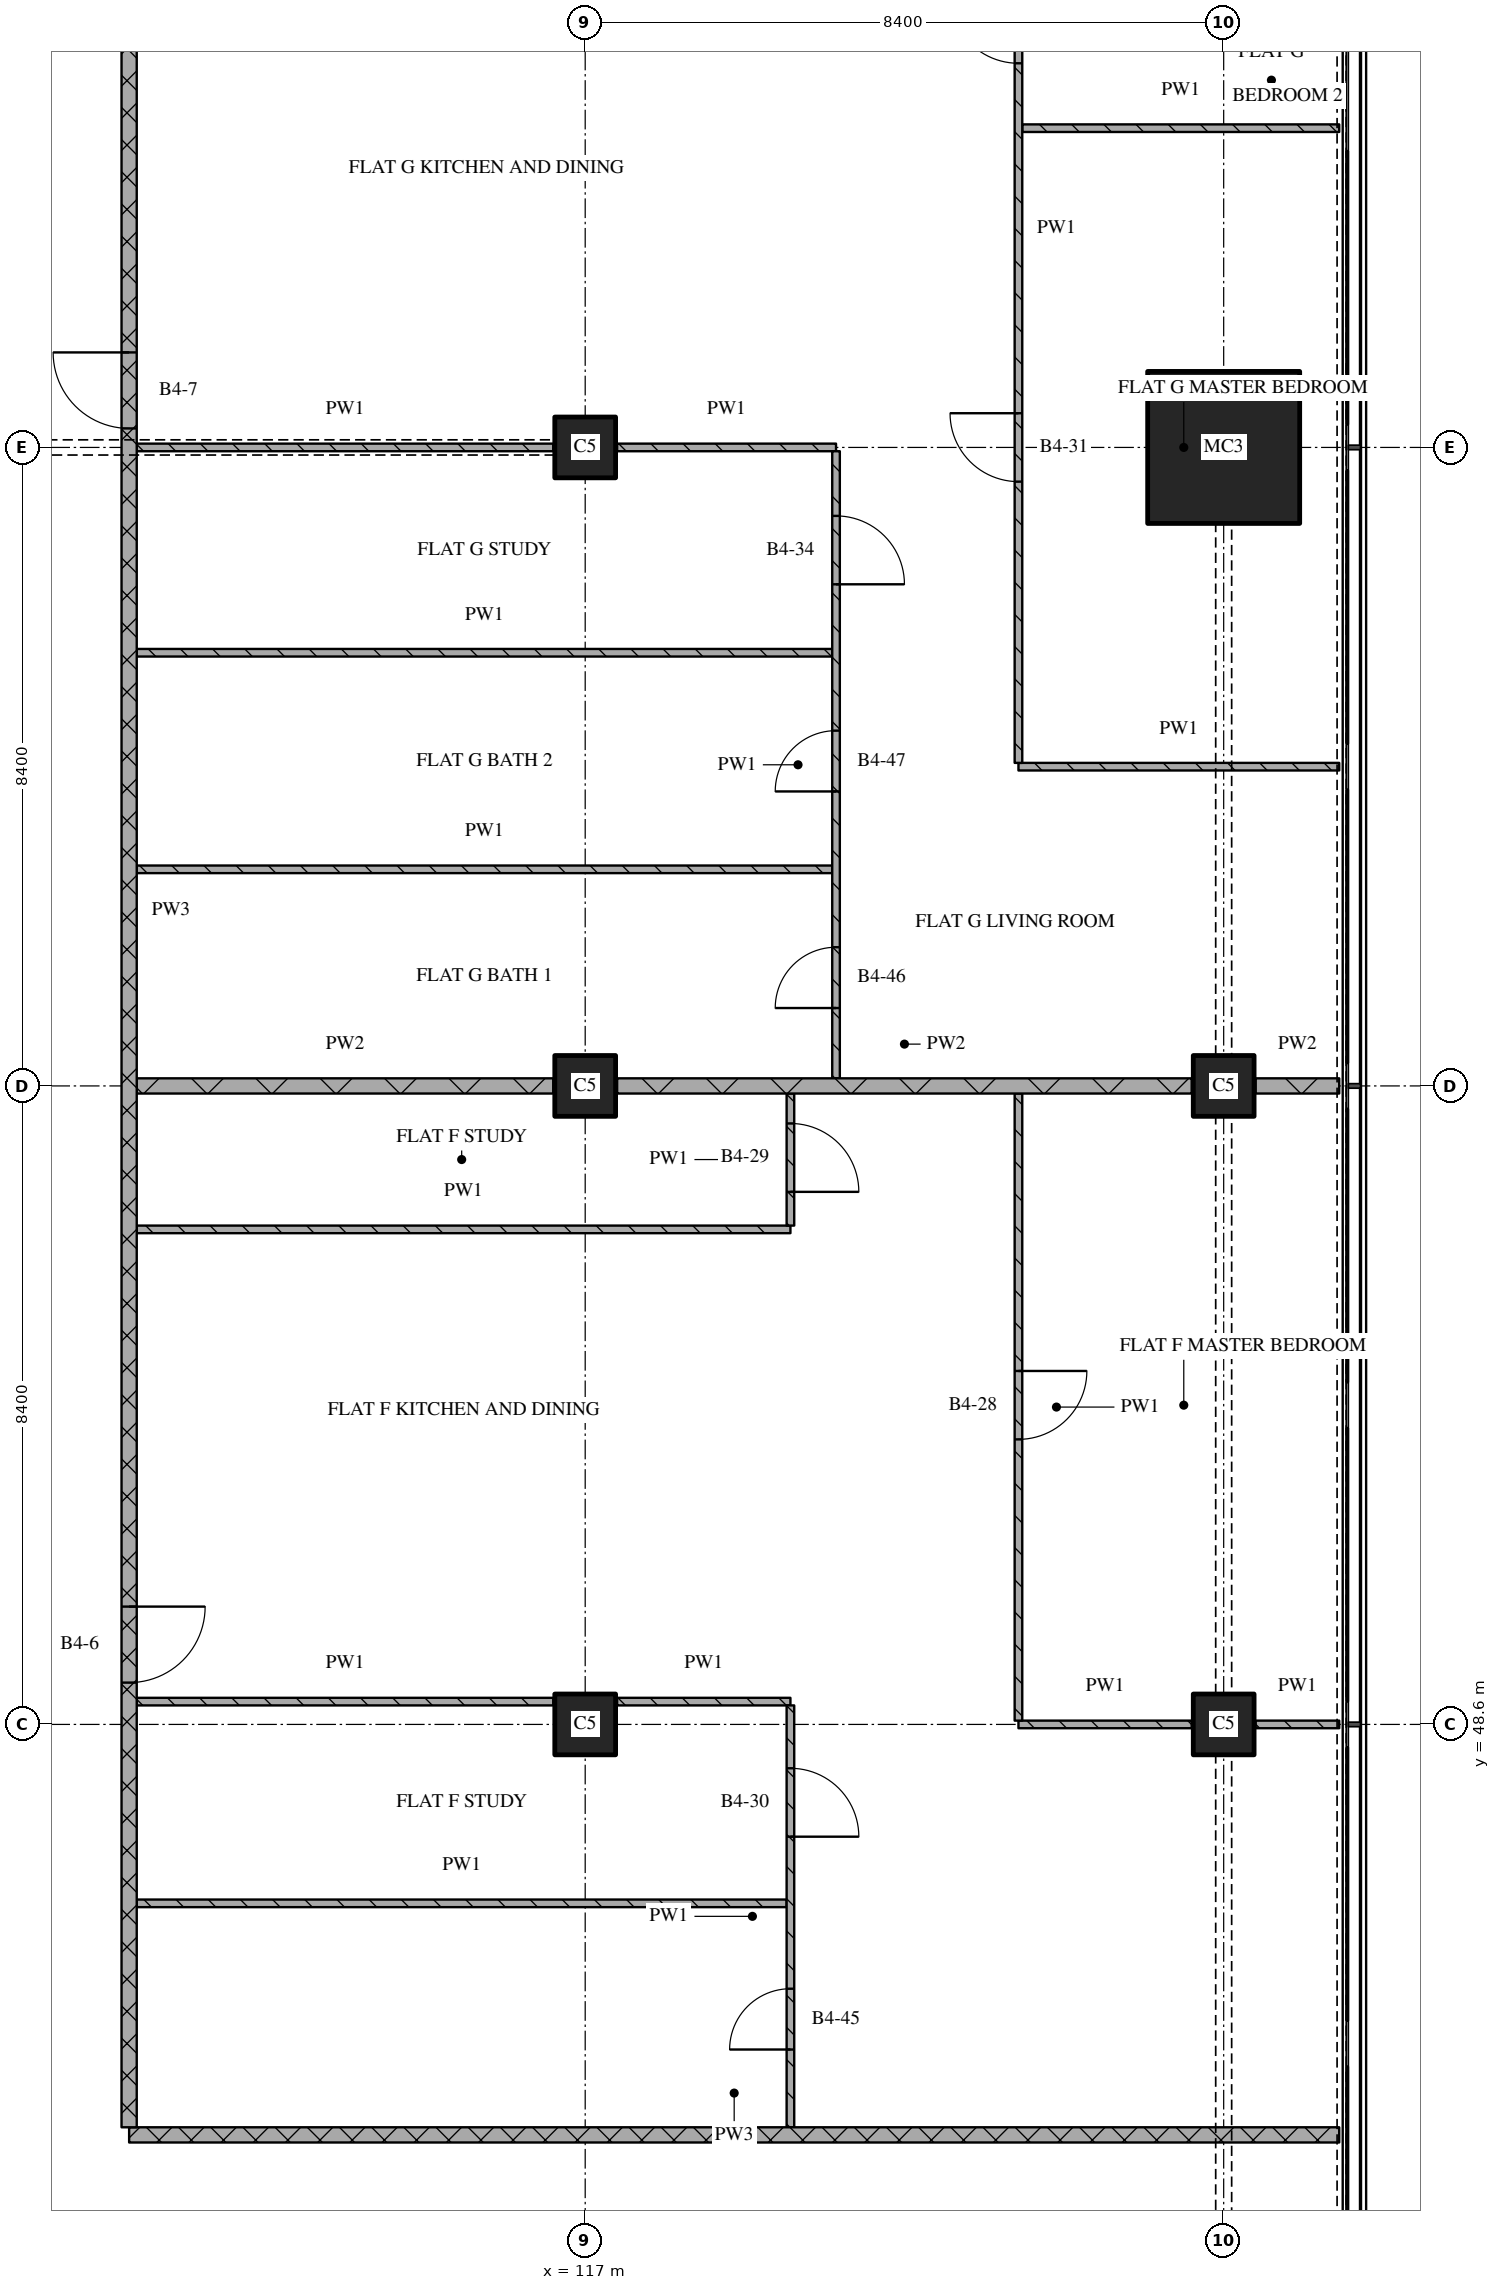
"""IFC4 building model, lengths in metres.
Left out: names, types, materials, properties, quantities, classifications, styles, units other than length and angle.
Written with IfcOpenShell. Run it as: python <this file> out.ifc"""

import sys

from ifc_helpers import new_model, si_unit, direction, frame, frame_2d, origin, origin_2d, place, context, subcontext, project, spatial, rectangle, extrude, element, fill, save


model = new_model("IFC4")
c1 = context("Model", 3, precision=1e-05, world=origin(), true_north=direction((0.0, 1.0)))
c2 = subcontext(c1, "Body", "Model", "MODEL_VIEW")
j1 = project(units=[si_unit("LENGTHUNIT", "METRE"), si_unit("PLANEANGLEUNIT", "RADIAN")], contexts=[c1])
p1 = place(None, origin())
s1 = spatial("IfcSite", under=j1, at=p1, CompositionType="ELEMENT")
p2 = place(p1, origin())
s2 = spatial("IfcBuilding", under=s1, at=p2, CompositionType="ELEMENT")
p3 = place(p2, frame((0.0, 0.0, 131.25)))
s3 = spatial("IfcBuildingStorey", under=s2, at=p3, CompositionType="ELEMENT", Elevation=131.25)
for number, where, z_axis, x_axis in (
    (1, (117.0, 48.6, 0.0), (0.0, 0.0, 1.0), (1.0, 0.0, 0.0)),
    (2, (117.0, 57.0, 0.0), (0.0, 0.0, 1.0), (1.0, 0.0, 0.0)),
    (3, (117.0, 65.4, 0.0), (0.0, 0.0, 1.0), (1.0, 0.0, 0.0)),
    (4, (125.4, 48.6, 0.0), (0.0, 0.0, 1.0), (1.0, 0.0, 0.0)),
    (5, (125.4, 57.0, 0.0), (0.0, 0.0, 1.0), (1.0, 0.0, 0.0)),
):
    element("IfcColumn", number, at=place(p3, frame(where, z_axis=z_axis, x_axis=x_axis)), inside=s3, PredefinedType="COLUMN", context=c2, shape_type="SweptSolid", body=[
        extrude(rectangle(XDim=0.8, YDim=0.8, at=origin_2d()), origin(), (0.0, 0.0, 1.0), 3.6),
    ])
p4 = place(p3, frame((125.4, 65.4, 0.0), z_axis=(0.0, 0.0, 1.0), x_axis=(1.0, 0.0, 0.0)))
e6 = element("IfcColumn", 6, at=p4, inside=s3, PredefinedType="COLUMN", context=c2, shape_type="SweptSolid", body=[
    extrude(rectangle(XDim=2.0, YDim=2.0, at=origin_2d()), origin(), (0.0, 0.0, 1.0), 3.6),
])
p5 = place(p3, frame((111.0, 43.2, 0.0), z_axis=(0.0, 0.0, 1.0), x_axis=(1.0, 0.0, 0.0)))
e7 = element("IfcWall", 7, at=p5, inside=s3, PredefinedType="PARTITIONING", context=c2, shape_type="SweptSolid", body=[
    extrude(rectangle(XDim=15.92, YDim=0.2, at=frame_2d((7.96, 0.0))), origin(), (0.0, 0.0, 1.0), 3.32),
])
p6 = place(p3, frame((111.1, 46.246, 0.0), z_axis=(0.0, 0.0, 1.0), x_axis=(1.0, 0.0, 0.0)))
e8 = element("IfcWall", 8, at=p6, inside=s3, PredefinedType="PARTITIONING", context=c2, shape_type="SweptSolid", body=[
    extrude(rectangle(XDim=8.55, YDim=0.1, at=frame_2d((4.275, 0.0))), origin(), (0.0, 0.0, 1.0), 3.32),
])
p7 = place(p3, frame((122.7, 48.6, 0.0), z_axis=(0.0, 0.0, 1.0), x_axis=(1.0, 0.0, 0.0)))
e9 = element("IfcWall", 9, at=p7, inside=s3, PredefinedType="PARTITIONING", context=c2, shape_type="SweptSolid", body=[
    extrude(rectangle(XDim=2.28, YDim=0.1, at=frame_2d((1.14, 0.0))), origin(), (0.0, 0.0, 1.0), 3.32),
])
p8 = place(p3, frame((125.82, 48.6, 0.0), z_axis=(0.0, 0.0, 1.0), x_axis=(1.0, 0.0, 0.0)))
e10 = element("IfcWall", 10, at=p8, inside=s3, PredefinedType="PARTITIONING", context=c2, shape_type="SweptSolid", body=[
    extrude(rectangle(XDim=1.1, YDim=0.1, at=frame_2d((0.55, 0.0))), origin(), (0.0, 0.0, 1.0), 3.32),
])
p9 = place(p3, frame((111.1, 48.9, 0.0), z_axis=(0.0, 0.0, 1.0), x_axis=(1.0, 0.0, 0.0)))
e11 = element("IfcWall", 11, at=p9, inside=s3, PredefinedType="PARTITIONING", context=c2, shape_type="SweptSolid", body=[
    extrude(rectangle(XDim=5.48, YDim=0.1, at=frame_2d((2.74, 0.0))), origin(), (0.0, 0.0, 1.0), 3.32),
])
p10 = place(p3, frame((117.42, 48.9, 0.0), z_axis=(0.0, 0.0, 1.0), x_axis=(1.0, 0.0, 0.0)))
e12 = element("IfcWall", 12, at=p10, inside=s3, PredefinedType="PARTITIONING", context=c2, shape_type="SweptSolid", body=[
    extrude(rectangle(XDim=2.28, YDim=0.1, at=frame_2d((1.14, 0.0))), origin(), (0.0, 0.0, 1.0), 3.32),
])
p11 = place(p3, frame((111.1, 55.113, 0.0), z_axis=(0.0, 0.0, 1.0), x_axis=(1.0, 0.0, 0.0)))
e13 = element("IfcWall", 13, at=p11, inside=s3, PredefinedType="PARTITIONING", context=c2, shape_type="SweptSolid", body=[
    extrude(rectangle(XDim=8.6, YDim=0.1, at=frame_2d((4.3, 0.0))), origin(), (0.0, 0.0, 1.0), 3.32),
])
p12 = place(p3, frame((111.1, 57.0, 0.0), z_axis=(0.0, 0.0, 1.0), x_axis=(1.0, 0.0, 0.0)))
e14 = element("IfcWall", 14, at=p12, inside=s3, PredefinedType="PARTITIONING", context=c2, shape_type="SweptSolid", body=[
    extrude(rectangle(XDim=5.48, YDim=0.2, at=frame_2d((2.74, 0.0))), origin(), (0.0, 0.0, 1.0), 3.32),
])
p13 = place(p3, frame((117.42, 57.0, 0.0), z_axis=(0.0, 0.0, 1.0), x_axis=(1.0, 0.0, 0.0)))
e15 = element("IfcWall", 15, at=p13, inside=s3, PredefinedType="PARTITIONING", context=c2, shape_type="SweptSolid", body=[
    extrude(rectangle(XDim=7.56, YDim=0.2, at=frame_2d((3.78, 0.0))), origin(), (0.0, 0.0, 1.0), 3.32),
])
p14 = place(p3, frame((125.82, 57.0, 0.0), z_axis=(0.0, 0.0, 1.0), x_axis=(1.0, 0.0, 0.0)))
e16 = element("IfcWall", 16, at=p14, inside=s3, PredefinedType="PARTITIONING", context=c2, shape_type="SweptSolid", body=[
    extrude(rectangle(XDim=1.1, YDim=0.2, at=frame_2d((0.55, 0.0))), origin(), (0.0, 0.0, 1.0), 3.32),
])
p15 = place(p3, frame((111.1, 59.85, 0.0), z_axis=(0.0, 0.0, 1.0), x_axis=(1.0, 0.0, 0.0)))
e17 = element("IfcWall", 17, at=p15, inside=s3, PredefinedType="PARTITIONING", context=c2, shape_type="SweptSolid", body=[
    extrude(rectangle(XDim=9.15, YDim=0.1, at=frame_2d((4.575, 0.0))), origin(), (0.0, 0.0, 1.0), 3.32),
])
p16 = place(p3, frame((122.7, 61.2, 0.0), z_axis=(0.0, 0.0, 1.0), x_axis=(1.0, 0.0, 0.0)))
e18 = element("IfcWall", 18, at=p16, inside=s3, PredefinedType="PARTITIONING", context=c2, shape_type="SweptSolid", body=[
    extrude(rectangle(XDim=4.22, YDim=0.1, at=frame_2d((2.11, 0.0))), origin(), (0.0, 0.0, 1.0), 3.32),
])
p17 = place(p3, frame((111.1, 62.699, 0.0), z_axis=(0.0, 0.0, 1.0), x_axis=(1.0, 0.0, 0.0)))
e19 = element("IfcWall", 19, at=p17, inside=s3, PredefinedType="PARTITIONING", context=c2, shape_type="SweptSolid", body=[
    extrude(rectangle(XDim=9.15, YDim=0.1, at=frame_2d((4.575, 0.0))), origin(), (0.0, 0.0, 1.0), 3.32),
])
p18 = place(p3, frame((111.1, 65.4, 0.0), z_axis=(0.0, 0.0, 1.0), x_axis=(1.0, 0.0, 0.0)))
e20 = element("IfcWall", 20, at=p18, inside=s3, PredefinedType="PARTITIONING", context=c2, shape_type="SweptSolid", body=[
    extrude(rectangle(XDim=5.48, YDim=0.1, at=frame_2d((2.74, 0.0))), origin(), (0.0, 0.0, 1.0), 2.82),
])
p19 = place(p3, frame((117.42, 65.4, 0.0), z_axis=(0.0, 0.0, 1.0), x_axis=(1.0, 0.0, 0.0)))
e21 = element("IfcWall", 21, at=p19, inside=s3, PredefinedType="PARTITIONING", context=c2, shape_type="SweptSolid", body=[
    extrude(rectangle(XDim=2.88, YDim=0.1, at=frame_2d((1.44, 0.0))), origin(), (0.0, 0.0, 1.0), 3.32),
])
p20 = place(p3, frame((122.75, 69.6, 0.0), z_axis=(0.0, 0.0, 1.0), x_axis=(1.0, 0.0, 0.0)))
e22 = element("IfcWall", 22, at=p20, inside=s3, PredefinedType="PARTITIONING", context=c2, shape_type="SweptSolid", body=[
    extrude(rectangle(XDim=4.17, YDim=0.1, at=frame_2d((2.085, 0.0))), origin(), (0.0, 0.0, 1.0), 3.32),
])
p21 = place(p3, frame((111.0, 75.32, 0.0), z_axis=(0.0, 0.0, 1.0), x_axis=(0.0, -1.0, 0.0)))
e23 = element("IfcWall", 23, at=p21, inside=s3, PredefinedType="PARTITIONING", context=c2, shape_type="SweptSolid", body=[
    extrude(rectangle(XDim=32.02, YDim=0.2, at=frame_2d((16.01, 0.0))), origin(), (0.0, 0.0, 1.0), 3.32),
])
p22 = place(p21, frame((8.67, 0.0, 0.0)))
e24 = element("IfcOpeningElement", 24, at=p22, cuts=e23, PredefinedType="OPENING", context=c2, shape_type="SweptSolid", body=[
    extrude(rectangle(XDim=1.0, YDim=2.1, at=frame_2d((0.5, 1.05))), frame((0.0, 0.11, 0.0), z_axis=(0.0, -1.0, 0.0), x_axis=(1.0, 0.0, 0.0)), (0.0, 0.0, 1.0), 0.22),
])
p23 = place(p21, frame((25.17, 0.0, 0.0)))
e25 = element("IfcOpeningElement", 25, at=p23, cuts=e23, PredefinedType="OPENING", context=c2, shape_type="SweptSolid", body=[
    extrude(rectangle(XDim=1.0, YDim=2.1, at=frame_2d((0.5, 1.05))), frame((0.0, 0.11, 0.0), z_axis=(0.0, -1.0, 0.0), x_axis=(1.0, 0.0, 0.0)), (0.0, 0.0, 1.0), 0.22),
])
p24 = place(p3, frame((119.7, 43.3, 0.0), z_axis=(0.0, 0.0, 1.0), x_axis=(0.0, 1.0, 0.0)))
e26 = element("IfcWall", 26, at=p24, inside=s3, PredefinedType="PARTITIONING", context=c2, shape_type="SweptSolid", body=[
    extrude(rectangle(XDim=5.55, YDim=0.1, at=frame_2d((2.775, 0.0))), origin(), (0.0, 0.0, 1.0), 3.32),
])
p25 = place(p24, frame((1.023, 0.0, 0.0)))
e27 = element("IfcOpeningElement", 27, at=p25, cuts=e26, PredefinedType="OPENING", context=c2, shape_type="SweptSolid", body=[
    extrude(rectangle(XDim=0.8, YDim=2.1, at=frame_2d((0.4, 1.05))), frame((0.0, 0.06, 0.0), z_axis=(0.0, -1.0, 0.0), x_axis=(1.0, 0.0, 0.0)), (0.0, 0.0, 1.0), 0.12),
])
p26 = place(p24, frame((3.823, 0.0, 0.0)))
e28 = element("IfcOpeningElement", 28, at=p26, cuts=e26, PredefinedType="OPENING", context=c2, shape_type="SweptSolid", body=[
    extrude(rectangle(XDim=0.9, YDim=2.1, at=frame_2d((0.45, 1.05))), frame((0.0, 0.06, 0.0), z_axis=(0.0, -1.0, 0.0), x_axis=(1.0, 0.0, 0.0)), (0.0, 0.0, 1.0), 0.12),
])
p27 = place(p3, frame((119.7, 55.163, 0.0), z_axis=(0.0, 0.0, 1.0), x_axis=(0.0, 1.0, 0.0)))
e29 = element("IfcWall", 29, at=p27, inside=s3, PredefinedType="PARTITIONING", context=c2, shape_type="SweptSolid", body=[
    extrude(rectangle(XDim=1.737, YDim=0.1, at=frame_2d((0.869, 0.0))), origin(), (0.0, 0.0, 1.0), 3.32),
])
p28 = place(p27, frame((0.444, 0.0, 0.0)))
e30 = element("IfcOpeningElement", 30, at=p28, cuts=e29, PredefinedType="OPENING", context=c2, shape_type="SweptSolid", body=[
    extrude(rectangle(XDim=0.9, YDim=2.1, at=frame_2d((0.45, 1.05))), frame((0.0, 0.06, 0.0), z_axis=(0.0, -1.0, 0.0), x_axis=(1.0, 0.0, 0.0)), (0.0, 0.0, 1.0), 0.12),
])
p29 = place(p3, frame((120.3, 57.1, 0.0), z_axis=(0.0, 0.0, 1.0), x_axis=(0.0, 1.0, 0.0)))
e31 = element("IfcWall", 31, at=p29, inside=s3, PredefinedType="PARTITIONING", context=c2, shape_type="SweptSolid", body=[
    extrude(rectangle(XDim=8.25, YDim=0.1, at=frame_2d((4.125, 0.0))), origin(), (0.0, 0.0, 1.0), 3.32),
])
p30 = place(p29, frame((0.925, 0.0, 0.0)))
e32 = element("IfcOpeningElement", 32, at=p30, cuts=e31, PredefinedType="OPENING", context=c2, shape_type="SweptSolid", body=[
    extrude(rectangle(XDim=0.8, YDim=2.1, at=frame_2d((0.4, 1.05))), frame((0.0, 0.06, 0.0), z_axis=(0.0, -1.0, 0.0), x_axis=(1.0, 0.0, 0.0)), (0.0, 0.0, 1.0), 0.12),
])
p31 = place(p29, frame((3.774, 0.0, 0.0)))
e33 = element("IfcOpeningElement", 33, at=p31, cuts=e31, PredefinedType="OPENING", context=c2, shape_type="SweptSolid", body=[
    extrude(rectangle(XDim=0.8, YDim=2.1, at=frame_2d((0.4, 1.05))), frame((0.0, 0.06, 0.0), z_axis=(0.0, -1.0, 0.0), x_axis=(1.0, 0.0, 0.0)), (0.0, 0.0, 1.0), 0.12),
])
p32 = place(p29, frame((6.5, 0.0, 0.0)))
e34 = element("IfcOpeningElement", 34, at=p32, cuts=e31, PredefinedType="OPENING", context=c2, shape_type="SweptSolid", body=[
    extrude(rectangle(XDim=0.9, YDim=2.1, at=frame_2d((0.45, 1.05))), frame((0.0, 0.06, 0.0), z_axis=(0.0, -1.0, 0.0), x_axis=(1.0, 0.0, 0.0)), (0.0, 0.0, 1.0), 0.12),
])
p33 = place(p3, frame((122.7, 56.9, 0.0), z_axis=(0.0, 0.0, 1.0), x_axis=(0.0, -1.0, 0.0)))
e35 = element("IfcWall", 35, at=p33, inside=s3, PredefinedType="PARTITIONING", context=c2, shape_type="SweptSolid", body=[
    extrude(rectangle(XDim=8.25, YDim=0.1, at=frame_2d((4.125, 0.0))), origin(), (0.0, 0.0, 1.0), 3.32),
])
p34 = place(p33, frame((3.65, 0.0, 0.0)))
e36 = element("IfcOpeningElement", 36, at=p34, cuts=e35, PredefinedType="OPENING", context=c2, shape_type="SweptSolid", body=[
    extrude(rectangle(XDim=0.9, YDim=2.1, at=frame_2d((0.45, 1.05))), frame((0.0, 0.06, 0.0), z_axis=(0.0, -1.0, 0.0), x_axis=(1.0, 0.0, 0.0)), (0.0, 0.0, 1.0), 0.12),
])
p35 = place(p3, frame((122.7, 75.32, 0.0), z_axis=(0.0, 0.0, 1.0), x_axis=(0.0, -1.0, 0.0)))
e37 = element("IfcWall", 37, at=p35, inside=s3, PredefinedType="PARTITIONING", context=c2, shape_type="SweptSolid", body=[
    extrude(rectangle(XDim=14.07, YDim=0.1, at=frame_2d((7.035, 0.0))), origin(), (0.0, 0.0, 1.0), 3.32),
])
p36 = place(p35, frame((3.966, 0.0, 0.0)))
e38 = element("IfcOpeningElement", 38, at=p36, cuts=e37, PredefinedType="OPENING", context=c2, shape_type="SweptSolid", body=[
    extrude(rectangle(XDim=0.9, YDim=2.1, at=frame_2d((0.45, 1.05))), frame((0.0, 0.06, 0.0), z_axis=(0.0, -1.0, 0.0), x_axis=(1.0, 0.0, 0.0)), (0.0, 0.0, 1.0), 0.12),
])
p37 = place(p35, frame((9.47, 0.0, 0.0)))
e39 = element("IfcOpeningElement", 39, at=p37, cuts=e37, PredefinedType="OPENING", context=c2, shape_type="SweptSolid", body=[
    extrude(rectangle(XDim=0.9, YDim=2.1, at=frame_2d((0.45, 1.05))), frame((0.0, 0.06, 0.0), z_axis=(0.0, -1.0, 0.0), x_axis=(1.0, 0.0, 0.0)), (0.0, 0.0, 1.0), 0.12),
])
p38 = place(p22, origin())
e40 = element("IfcDoor", 40, at=p38, inside=s3, OperationType="SINGLE_SWING_RIGHT", PredefinedType="DOOR", context=c2, shape_type="SweptSolid", body=[
    extrude(rectangle(XDim=1.0, YDim=2.1, at=frame_2d((0.5, 1.05))), frame((0.0, 0.025, 0.0), z_axis=(0.0, -1.0, 0.0), x_axis=(1.0, 0.0, 0.0)), (0.0, 0.0, 1.0), 0.05),
])
fill(e24, e40)
p39 = place(p23, origin())
e41 = element("IfcDoor", 41, at=p39, inside=s3, OperationType="SINGLE_SWING_LEFT", PredefinedType="DOOR", context=c2, shape_type="SweptSolid", body=[
    extrude(rectangle(XDim=1.0, YDim=2.1, at=frame_2d((0.5, 1.05))), frame((0.0, 0.025, 0.0), z_axis=(0.0, -1.0, 0.0), x_axis=(1.0, 0.0, 0.0)), (0.0, 0.0, 1.0), 0.05),
])
fill(e25, e41)
p40 = place(p25, origin())
e42 = element("IfcDoor", 42, at=p40, inside=s3, OperationType="SINGLE_SWING_LEFT", PredefinedType="DOOR", context=c2, shape_type="SweptSolid", body=[
    extrude(rectangle(XDim=0.8, YDim=2.1, at=frame_2d((0.4, 1.05))), frame((0.0, 0.025, 0.0), z_axis=(0.0, -1.0, 0.0), x_axis=(1.0, 0.0, 0.0)), (0.0, 0.0, 1.0), 0.05),
])
fill(e27, e42)
p41 = place(p26, origin())
e43 = element("IfcDoor", 43, at=p41, inside=s3, OperationType="SINGLE_SWING_RIGHT", PredefinedType="DOOR", context=c2, shape_type="SweptSolid", body=[
    extrude(rectangle(XDim=0.9, YDim=2.1, at=frame_2d((0.45, 1.05))), frame((0.0, 0.025, 0.0), z_axis=(0.0, -1.0, 0.0), x_axis=(1.0, 0.0, 0.0)), (0.0, 0.0, 1.0), 0.05),
])
fill(e28, e43)
p42 = place(p28, origin())
e44 = element("IfcDoor", 44, at=p42, inside=s3, OperationType="SINGLE_SWING_RIGHT", PredefinedType="DOOR", context=c2, shape_type="SweptSolid", body=[
    extrude(rectangle(XDim=0.9, YDim=2.1, at=frame_2d((0.45, 1.05))), frame((0.0, 0.025, 0.0), z_axis=(0.0, -1.0, 0.0), x_axis=(1.0, 0.0, 0.0)), (0.0, 0.0, 1.0), 0.05),
])
fill(e30, e44)
p43 = place(p30, origin())
e45 = element("IfcDoor", 45, at=p43, inside=s3, OperationType="SINGLE_SWING_LEFT", PredefinedType="DOOR", context=c2, shape_type="SweptSolid", body=[
    extrude(rectangle(XDim=0.8, YDim=2.1, at=frame_2d((0.4, 1.05))), frame((0.0, 0.025, 0.0), z_axis=(0.0, -1.0, 0.0), x_axis=(1.0, 0.0, 0.0)), (0.0, 0.0, 1.0), 0.05),
])
fill(e32, e45)
p44 = place(p31, origin())
e46 = element("IfcDoor", 46, at=p44, inside=s3, OperationType="SINGLE_SWING_LEFT", PredefinedType="DOOR", context=c2, shape_type="SweptSolid", body=[
    extrude(rectangle(XDim=0.8, YDim=2.1, at=frame_2d((0.4, 1.05))), frame((0.0, 0.025, 0.0), z_axis=(0.0, -1.0, 0.0), x_axis=(1.0, 0.0, 0.0)), (0.0, 0.0, 1.0), 0.05),
])
fill(e33, e46)
p45 = place(p32, origin())
e47 = element("IfcDoor", 47, at=p45, inside=s3, OperationType="SINGLE_SWING_RIGHT", PredefinedType="DOOR", context=c2, shape_type="SweptSolid", body=[
    extrude(rectangle(XDim=0.9, YDim=2.1, at=frame_2d((0.45, 1.05))), frame((0.0, 0.025, 0.0), z_axis=(0.0, -1.0, 0.0), x_axis=(1.0, 0.0, 0.0)), (0.0, 0.0, 1.0), 0.05),
])
fill(e34, e47)
p46 = place(p34, origin())
e48 = element("IfcDoor", 48, at=p46, inside=s3, OperationType="SINGLE_SWING_LEFT", PredefinedType="DOOR", context=c2, shape_type="SweptSolid", body=[
    extrude(rectangle(XDim=0.9, YDim=2.1, at=frame_2d((0.45, 1.05))), frame((0.0, 0.025, 0.0), z_axis=(0.0, -1.0, 0.0), x_axis=(1.0, 0.0, 0.0)), (0.0, 0.0, 1.0), 0.05),
])
fill(e36, e48)
p47 = place(p36, origin())
e49 = element("IfcDoor", 49, at=p47, inside=s3, OperationType="SINGLE_SWING_RIGHT", PredefinedType="DOOR", context=c2, shape_type="SweptSolid", body=[
    extrude(rectangle(XDim=0.9, YDim=2.1, at=frame_2d((0.45, 1.05))), frame((0.0, 0.025, 0.0), z_axis=(0.0, -1.0, 0.0), x_axis=(1.0, 0.0, 0.0)), (0.0, 0.0, 1.0), 0.05),
])
fill(e38, e49)
p48 = place(p37, origin())
e50 = element("IfcDoor", 50, at=p48, inside=s3, OperationType="SINGLE_SWING_RIGHT", PredefinedType="DOOR", context=c2, shape_type="SweptSolid", body=[
    extrude(rectangle(XDim=0.9, YDim=2.1, at=frame_2d((0.45, 1.05))), frame((0.0, 0.025, 0.0), z_axis=(0.0, -1.0, 0.0), x_axis=(1.0, 0.0, 0.0)), (0.0, 0.0, 1.0), 0.05),
])
fill(e39, e50)
save(model, sys.argv[1])
